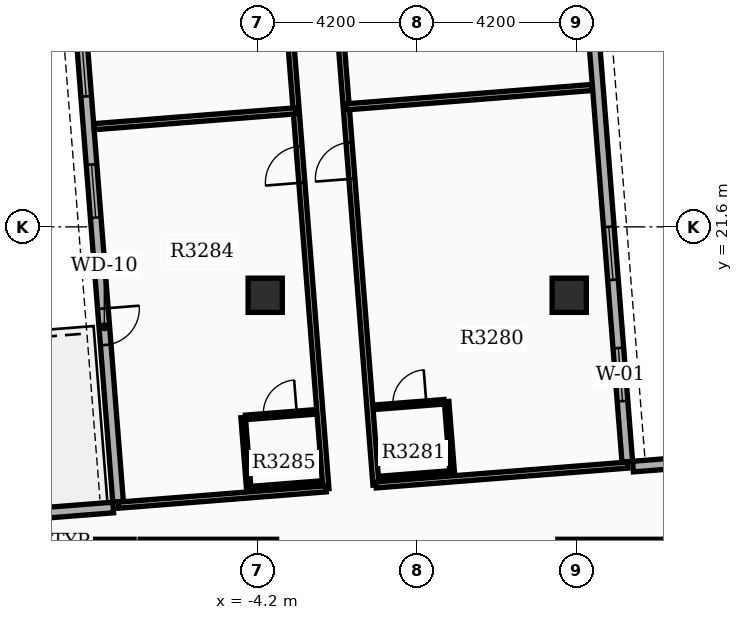
"""IFC4 building model, lengths in metres.
Left out: names, types, materials, properties, quantities, classifications, styles, units other than length and angle.
Written with IfcOpenShell. Run it as: python <this file> out.ifc"""

import sys

from ifc_helpers import new_model, si_unit, direction, frame, frame_2d, origin, origin_2d, place, context, subcontext, project, spatial, rectangle, extrude, element, fill, save


model = new_model("IFC4")
c1 = context("Model", 3, precision=1e-05, world=origin(), true_north=direction((0.0, 1.0)))
c2 = subcontext(c1, "Body", "Model", "MODEL_VIEW")
j1 = project(units=[si_unit("LENGTHUNIT", "METRE"), si_unit("PLANEANGLEUNIT", "RADIAN")], contexts=[c1])
p1 = place(None, origin())
s1 = spatial("IfcSite", under=j1, at=p1, CompositionType="ELEMENT")
p2 = place(p1, origin())
s2 = spatial("IfcBuilding", under=s1, at=p2, CompositionType="ELEMENT")
p3 = place(p2, frame((0.0, 0.0, 205.2)))
s3 = spatial("IfcBuildingStorey", under=s2, at=p3, CompositionType="ELEMENT", Elevation=205.2)
for number, where, z_axis, x_axis in (
    (1, (-4.0, 19.8, 0.0), (0.0, 0.0, 1.0), (1.0, 0.0, 0.0)),
    (2, (4.0, 19.8, 0.0), (0.0, 0.0, 1.0), (1.0, 0.0, 0.0)),
):
    element("IfcColumn", number, at=place(p3, frame(where, z_axis=z_axis, x_axis=x_axis)), inside=s3, PredefinedType="COLUMN", context=c2, shape_type="SweptSolid", body=[
        extrude(rectangle(XDim=0.9, YDim=0.9, at=origin_2d()), origin(), (0.0, 0.0, 1.0), 3.9),
    ])
p4 = place(p3, frame((5.527, 15.421, 0.0), z_axis=(0.0, 0.0, 1.0), x_axis=(-0.078452802979, 0.996917828963, 0.0)))
e3 = element("IfcWall", 3, at=p4, inside=s3, PredefinedType="STANDARD", context=c2, shape_type="SweptSolid", body=[
    extrude(rectangle(XDim=20.1, YDim=0.28, at=frame_2d((10.05, 0.0))), origin(), (0.0, 0.0, 1.0), 3.18),
])
p5 = place(p4, frame((1.6, 0.0, 0.8)))
e4 = element("IfcOpeningElement", 4, at=p5, cuts=e3, PredefinedType="OPENING", context=c2, shape_type="SweptSolid", body=[
    extrude(rectangle(XDim=1.4, YDim=1.6, at=frame_2d((0.7, 0.8))), frame((0.0, 0.15, 0.0), z_axis=(0.0, -1.0, 0.0), x_axis=(1.0, 0.0, 0.0)), (0.0, 0.0, 1.0), 0.3),
])
p6 = place(p4, frame((4.8, 0.0, 0.8)))
e5 = element("IfcOpeningElement", 5, at=p6, cuts=e3, PredefinedType="OPENING", context=c2, shape_type="SweptSolid", body=[
    extrude(rectangle(XDim=1.4, YDim=1.6, at=frame_2d((0.7, 0.8))), frame((0.0, 0.15, 0.0), z_axis=(0.0, -1.0, 0.0), x_axis=(1.0, 0.0, 0.0)), (0.0, 0.0, 1.0), 0.3),
])
p7 = place(p4, frame((12.75, 0.0, 0.8)))
e6 = element("IfcOpeningElement", 6, at=p7, cuts=e3, PredefinedType="OPENING", context=c2, shape_type="SweptSolid", body=[
    extrude(rectangle(XDim=1.4, YDim=1.6, at=frame_2d((0.7, 0.8))), frame((0.0, 0.15, 0.0), z_axis=(0.0, -1.0, 0.0), x_axis=(1.0, 0.0, 0.0)), (0.0, 0.0, 1.0), 0.3),
])
p8 = place(p4, frame((15.95, 0.0, 0.8)))
e7 = element("IfcOpeningElement", 7, at=p8, cuts=e3, PredefinedType="OPENING", context=c2, shape_type="SweptSolid", body=[
    extrude(rectangle(XDim=1.4, YDim=1.6, at=frame_2d((0.7, 0.8))), frame((0.0, 0.15, 0.0), z_axis=(0.0, -1.0, 0.0), x_axis=(1.0, 0.0, 0.0)), (0.0, 0.0, 1.0), 0.3),
])
p9 = place(p3, frame((-9.448, 34.405, 0.0), z_axis=(0.0, 0.0, 1.0), x_axis=(0.078452802979, -0.996917828963, 0.0)))
e8 = element("IfcWall", 8, at=p9, inside=s3, PredefinedType="STANDARD", context=c2, shape_type="SweptSolid", body=[
    extrude(rectangle(XDim=20.1, YDim=0.28, at=frame_2d((10.05, 0.0))), origin(), (0.0, 0.0, 1.0), 3.18),
])
p10 = place(p9, frame((1.6, 0.0, 0.8)))
e9 = element("IfcOpeningElement", 9, at=p10, cuts=e8, PredefinedType="OPENING", context=c2, shape_type="SweptSolid", body=[
    extrude(rectangle(XDim=1.4, YDim=1.6, at=frame_2d((0.7, 0.8))), frame((0.0, 0.15, 0.0), z_axis=(0.0, -1.0, 0.0), x_axis=(1.0, 0.0, 0.0)), (0.0, 0.0, 1.0), 0.3),
])
p11 = place(p9, frame((4.8, 0.0, 0.8)))
e10 = element("IfcOpeningElement", 10, at=p11, cuts=e8, PredefinedType="OPENING", context=c2, shape_type="SweptSolid", body=[
    extrude(rectangle(XDim=1.4, YDim=1.6, at=frame_2d((0.7, 0.8))), frame((0.0, 0.15, 0.0), z_axis=(0.0, -1.0, 0.0), x_axis=(1.0, 0.0, 0.0)), (0.0, 0.0, 1.0), 0.3),
])
p12 = place(p9, frame((8.0, 0.0, 0.8)))
e11 = element("IfcOpeningElement", 11, at=p12, cuts=e8, PredefinedType="OPENING", context=c2, shape_type="SweptSolid", body=[
    extrude(rectangle(XDim=1.4, YDim=1.6, at=frame_2d((0.7, 0.8))), frame((0.0, 0.15, 0.0), z_axis=(0.0, -1.0, 0.0), x_axis=(1.0, 0.0, 0.0)), (0.0, 0.0, 1.0), 0.3),
])
p13 = place(p9, frame((11.2, 0.0, 0.8)))
e12 = element("IfcOpeningElement", 12, at=p13, cuts=e8, PredefinedType="OPENING", context=c2, shape_type="SweptSolid", body=[
    extrude(rectangle(XDim=1.4, YDim=1.6, at=frame_2d((0.7, 0.8))), frame((0.0, 0.15, 0.0), z_axis=(0.0, -1.0, 0.0), x_axis=(1.0, 0.0, 0.0)), (0.0, 0.0, 1.0), 0.3),
])
p14 = place(p9, frame((15.0, 0.0, 0.0)))
e13 = element("IfcOpeningElement", 13, at=p14, cuts=e8, PredefinedType="OPENING", context=c2, shape_type="SweptSolid", body=[
    extrude(rectangle(XDim=0.96, YDim=2.1, at=frame_2d((0.48, 1.05))), frame((0.0, 0.15, 0.0), z_axis=(0.0, -1.0, 0.0), x_axis=(1.0, 0.0, 0.0)), (0.0, 0.0, 1.0), 0.3),
])
p15 = place(p3, frame((11.958, 15.787, 0.0), z_axis=(0.0, 0.0, 1.0), x_axis=(-0.996916125428, -0.078474447191, 0.0)))
e14 = element("IfcWall", 14, at=p15, inside=s3, PredefinedType="STANDARD", context=c2, shape_type="SweptSolid", body=[
    extrude(rectangle(XDim=6.3, YDim=0.28, at=frame_2d((3.15, 0.0))), origin(), (0.0, 0.0, 1.0), 3.18),
])
p16 = place(p3, frame((-14.281, 13.722, 0.0), z_axis=(0.0, 0.0, 1.0), x_axis=(0.99691915642, 0.078435932851, 0.0)))
e15 = element("IfcWall", 15, at=p16, inside=s3, PredefinedType="STANDARD", context=c2, shape_type="SweptSolid", body=[
    extrude(rectangle(XDim=6.3, YDim=0.28, at=frame_2d((3.15, 0.0))), origin(), (0.0, 0.0, 1.0), 3.18),
])
p17 = place(p3, frame((-11.0, 13.3, 0.0), z_axis=(0.0, 0.0, 1.0), x_axis=(1.0, 0.0, 0.0)))
e16 = element("IfcWall", 16, at=p17, inside=s3, PredefinedType="PARTITIONING", context=c2, shape_type="SweptSolid", body=[
    extrude(rectangle(XDim=3.55, YDim=0.16, at=frame_2d((1.775, 0.0))), origin(), (0.0, 0.0, 1.0), 3.17),
])
p18 = place(p3, frame((-7.29, 13.3, 0.0), z_axis=(0.0, 0.0, 1.0), x_axis=(1.0, 0.0, 0.0)))
e17 = element("IfcWall", 17, at=p18, inside=s3, PredefinedType="PARTITIONING", context=c2, shape_type="SweptSolid", body=[
    extrude(rectangle(XDim=3.59, YDim=0.16, at=frame_2d((1.795, 0.0))), origin(), (0.0, 0.0, 1.0), 3.17),
])
p19 = place(p3, frame((3.7, 13.3, 0.0), z_axis=(0.0, 0.0, 1.0), x_axis=(1.0, 0.0, 0.0)))
e18 = element("IfcWall", 18, at=p19, inside=s3, PredefinedType="PARTITIONING", context=c2, shape_type="SweptSolid", body=[
    extrude(rectangle(XDim=3.75, YDim=0.16, at=frame_2d((1.875, 0.0))), origin(), (0.0, 0.0, 1.0), 3.17),
])
p20 = place(p3, frame((-1.085, 14.811, 0.0), z_axis=(0.0, 0.0, 1.0), x_axis=(-0.0784484395, 0.996918172339, 0.0)))
e19 = element("IfcWall", 19, at=p20, inside=s3, PredefinedType="PARTITIONING", context=c2, shape_type="SweptSolid", body=[
    extrude(rectangle(XDim=20.182, YDim=0.16, at=frame_2d((10.091, 0.0))), origin(), (0.0, 0.0, 1.0), 3.17),
])
p21 = place(p20, frame((8.08, 0.0, 0.0)))
e20 = element("IfcOpeningElement", 20, at=p21, cuts=e19, PredefinedType="OPENING", context=c2, shape_type="SweptSolid", body=[
    extrude(rectangle(XDim=0.96, YDim=2.15, at=frame_2d((0.48, 1.075))), frame((0.0, 0.09, 0.0), z_axis=(0.0, -1.0, 0.0), x_axis=(1.0, 0.0, 0.0)), (0.0, 0.0, 1.0), 0.18),
])
p22 = place(p20, frame((16.247, 0.0, 0.0)))
e21 = element("IfcOpeningElement", 21, at=p22, cuts=e19, PredefinedType="OPENING", context=c2, shape_type="SweptSolid", body=[
    extrude(rectangle(XDim=0.96, YDim=2.15, at=frame_2d((0.48, 1.075))), frame((0.0, 0.09, 0.0), z_axis=(0.0, -1.0, 0.0), x_axis=(1.0, 0.0, 0.0)), (0.0, 0.0, 1.0), 0.18),
])
p23 = place(p3, frame((-1.085, 14.811, 0.0), z_axis=(0.0, 0.0, 1.0), x_axis=(0.996917098135, 0.078462089231, 0.0)))
e22 = element("IfcWall", 22, at=p23, inside=s3, PredefinedType="PARTITIONING", context=c2, shape_type="SweptSolid", body=[
    extrude(rectangle(XDim=6.64, YDim=0.16, at=frame_2d((3.32, 0.0))), origin(), (0.0, 0.0, 1.0), 3.17),
])
p24 = place(p3, frame((-1.868, 24.758, 0.0), z_axis=(0.0, 0.0, 1.0), x_axis=(0.996918226549, 0.078447750597, 0.0)))
e23 = element("IfcWall", 23, at=p24, inside=s3, PredefinedType="PARTITIONING", context=c2, shape_type="SweptSolid", body=[
    extrude(rectangle(XDim=6.492, YDim=0.16, at=frame_2d((3.246, 0.0))), origin(), (0.0, 0.0, 1.0), 3.17),
])
p25 = place(p3, frame((-1.106, 16.855, 0.0), z_axis=(0.0, 0.0, 1.0), x_axis=(0.996916400774, 0.0784709492, 0.0)))
e24 = element("IfcWall", 24, at=p25, inside=s3, PredefinedType="PARTITIONING", context=c2, shape_type="SweptSolid", body=[
    extrude(rectangle(XDim=1.82, YDim=0.12, at=frame_2d((0.91, 0.0))), origin(), (0.0, 0.0, 1.0), 3.17),
])
p26 = place(p25, frame((0.47, 0.0, 0.0)))
e25 = element("IfcOpeningElement", 25, at=p26, cuts=e24, PredefinedType="OPENING", context=c2, shape_type="SweptSolid", body=[
    extrude(rectangle(XDim=0.88, YDim=2.1, at=frame_2d((0.44, 1.05))), frame((0.0, 0.07, 0.0), z_axis=(0.0, -1.0, 0.0), x_axis=(1.0, 0.0, 0.0)), (0.0, 0.0, 1.0), 0.14),
])
p27 = place(p3, frame((-0.958, 14.981, 0.0), z_axis=(0.0, 0.0, 1.0), x_axis=(0.996915574626, 0.078481444107, 0.0)))
e26 = element("IfcWall", 26, at=p27, inside=s3, PredefinedType="PARTITIONING", context=c2, shape_type="SweptSolid", body=[
    extrude(rectangle(XDim=1.82, YDim=0.12, at=frame_2d((0.91, 0.0))), origin(), (0.0, 0.0, 1.0), 3.17),
])
p28 = place(p3, frame((0.921, 15.129, 0.0), z_axis=(0.0, 0.0, 1.0), x_axis=(-0.078563244057, 0.996909131608, 0.0)))
e27 = element("IfcWall", 27, at=p28, inside=s3, PredefinedType="PARTITIONING", context=c2, shape_type="SweptSolid", body=[
    extrude(rectangle(XDim=1.88, YDim=0.12, at=frame_2d((0.94, 0.0))), origin(), (0.0, 0.0, 1.0), 3.17),
])
p29 = place(p3, frame((-2.401, 14.707, 0.0), z_axis=(0.0, 0.0, 1.0), x_axis=(-0.078460461943, 0.996917226209, 0.0)))
e28 = element("IfcWall", 28, at=p29, inside=s3, PredefinedType="PARTITIONING", context=c2, shape_type="SweptSolid", body=[
    extrude(rectangle(XDim=20.182, YDim=0.16, at=frame_2d((10.091, 0.0))), origin(), (0.0, 0.0, 1.0), 3.17),
])
p30 = place(p29, frame((8.08, 0.0, 0.0)))
e29 = element("IfcOpeningElement", 29, at=p30, cuts=e28, PredefinedType="OPENING", context=c2, shape_type="SweptSolid", body=[
    extrude(rectangle(XDim=0.96, YDim=2.15, at=frame_2d((0.48, 1.075))), frame((0.0, 0.09, 0.0), z_axis=(0.0, -1.0, 0.0), x_axis=(1.0, 0.0, 0.0)), (0.0, 0.0, 1.0), 0.18),
])
p31 = place(p29, frame((16.247, 0.0, 0.0)))
e30 = element("IfcOpeningElement", 30, at=p31, cuts=e28, PredefinedType="OPENING", context=c2, shape_type="SweptSolid", body=[
    extrude(rectangle(XDim=0.96, YDim=2.15, at=frame_2d((0.48, 1.075))), frame((0.0, 0.09, 0.0), z_axis=(0.0, -1.0, 0.0), x_axis=(1.0, 0.0, 0.0)), (0.0, 0.0, 1.0), 0.18),
])
p32 = place(p3, frame((-2.401, 14.707, 0.0), z_axis=(0.0, 0.0, 1.0), x_axis=(-0.996921193864, -0.078410032676, 0.0)))
e31 = element("IfcWall", 31, at=p32, inside=s3, PredefinedType="PARTITIONING", context=c2, shape_type="SweptSolid", body=[
    extrude(rectangle(XDim=5.48, YDim=0.16, at=frame_2d((2.74, 0.0))), origin(), (0.0, 0.0, 1.0), 3.17),
])
p33 = place(p3, frame((-3.184, 24.654, 0.0), z_axis=(0.0, 0.0, 1.0), x_axis=(-0.996915801681, -0.078478559871, 0.0)))
e32 = element("IfcWall", 32, at=p33, inside=s3, PredefinedType="PARTITIONING", context=c2, shape_type="SweptSolid", body=[
    extrude(rectangle(XDim=5.332, YDim=0.16, at=frame_2d((2.666, 0.0))), origin(), (0.0, 0.0, 1.0), 3.17),
])
p34 = place(p3, frame((-4.515, 16.587, 0.0), z_axis=(0.0, 0.0, 1.0), x_axis=(0.996916400774, 0.0784709492, 0.0)))
e33 = element("IfcWall", 33, at=p34, inside=s3, PredefinedType="PARTITIONING", context=c2, shape_type="SweptSolid", body=[
    extrude(rectangle(XDim=1.82, YDim=0.12, at=frame_2d((0.91, 0.0))), origin(), (0.0, 0.0, 1.0), 3.17),
])
p35 = place(p34, frame((0.47, 0.0, 0.0)))
e34 = element("IfcOpeningElement", 34, at=p35, cuts=e33, PredefinedType="OPENING", context=c2, shape_type="SweptSolid", body=[
    extrude(rectangle(XDim=0.88, YDim=2.1, at=frame_2d((0.44, 1.05))), frame((0.0, 0.07, 0.0), z_axis=(0.0, -1.0, 0.0), x_axis=(1.0, 0.0, 0.0)), (0.0, 0.0, 1.0), 0.14),
])
p36 = place(p3, frame((-4.368, 14.713, 0.0), z_axis=(0.0, 0.0, 1.0), x_axis=(0.996916400774, 0.0784709492, 0.0)))
e35 = element("IfcWall", 35, at=p36, inside=s3, PredefinedType="PARTITIONING", context=c2, shape_type="SweptSolid", body=[
    extrude(rectangle(XDim=1.82, YDim=0.12, at=frame_2d((0.91, 0.0))), origin(), (0.0, 0.0, 1.0), 3.17),
])
p37 = place(p3, frame((-4.433, 14.708, 0.0), z_axis=(0.0, 0.0, 1.0), x_axis=(-0.07843418698, 0.996919293781, 0.0)))
e36 = element("IfcWall", 36, at=p37, inside=s3, PredefinedType="PARTITIONING", context=c2, shape_type="SweptSolid", body=[
    extrude(rectangle(XDim=1.88, YDim=0.12, at=frame_2d((0.94, 0.0))), origin(), (0.0, 0.0, 1.0), 3.17),
])
p38 = place(p5, origin())
e37 = element("IfcWindow", 37, at=p38, inside=s3, PartitioningType="SINGLE_PANEL", PredefinedType="WINDOW", context=c2, shape_type="SweptSolid", body=[
    extrude(rectangle(XDim=1.4, YDim=1.6, at=frame_2d((0.7, 0.8))), frame((0.0, 0.03, 0.0), z_axis=(0.0, -1.0, 0.0), x_axis=(1.0, 0.0, 0.0)), (0.0, 0.0, 1.0), 0.06),
])
fill(e4, e37)
p39 = place(p6, origin())
e38 = element("IfcWindow", 38, at=p39, inside=s3, PartitioningType="SINGLE_PANEL", PredefinedType="WINDOW", context=c2, shape_type="SweptSolid", body=[
    extrude(rectangle(XDim=1.4, YDim=1.6, at=frame_2d((0.7, 0.8))), frame((0.0, 0.03, 0.0), z_axis=(0.0, -1.0, 0.0), x_axis=(1.0, 0.0, 0.0)), (0.0, 0.0, 1.0), 0.06),
])
fill(e5, e38)
p40 = place(p12, origin())
e39 = element("IfcWindow", 39, at=p40, inside=s3, PartitioningType="SINGLE_PANEL", PredefinedType="WINDOW", context=c2, shape_type="SweptSolid", body=[
    extrude(rectangle(XDim=1.4, YDim=1.6, at=frame_2d((0.7, 0.8))), frame((0.0, 0.03, 0.0), z_axis=(0.0, -1.0, 0.0), x_axis=(1.0, 0.0, 0.0)), (0.0, 0.0, 1.0), 0.06),
])
fill(e11, e39)
p41 = place(p13, origin())
e40 = element("IfcWindow", 40, at=p41, inside=s3, PartitioningType="SINGLE_PANEL", PredefinedType="WINDOW", context=c2, shape_type="SweptSolid", body=[
    extrude(rectangle(XDim=1.4, YDim=1.6, at=frame_2d((0.7, 0.8))), frame((0.0, 0.03, 0.0), z_axis=(0.0, -1.0, 0.0), x_axis=(1.0, 0.0, 0.0)), (0.0, 0.0, 1.0), 0.06),
])
fill(e12, e40)
p42 = place(p14, origin())
e41 = element("IfcDoor", 41, at=p42, inside=s3, OperationType="SINGLE_SWING_LEFT", PredefinedType="DOOR", context=c2, shape_type="SweptSolid", body=[
    extrude(rectangle(XDim=0.96, YDim=2.1, at=frame_2d((0.48, 1.05))), frame((0.0, 0.025, 0.0), z_axis=(0.0, -1.0, 0.0), x_axis=(1.0, 0.0, 0.0)), (0.0, 0.0, 1.0), 0.05),
])
fill(e13, e41)
p43 = place(p21, origin())
e42 = element("IfcDoor", 42, at=p43, inside=s3, OperationType="SINGLE_SWING_LEFT", PredefinedType="DOOR", context=c2, shape_type="SweptSolid", body=[
    extrude(rectangle(XDim=0.96, YDim=2.15, at=frame_2d((0.48, 1.075))), frame((0.0, 0.025, 0.0), z_axis=(0.0, -1.0, 0.0), x_axis=(1.0, 0.0, 0.0)), (0.0, 0.0, 1.0), 0.05),
])
fill(e20, e42)
p44 = place(p26, origin())
e43 = element("IfcDoor", 43, at=p44, inside=s3, OperationType="SINGLE_SWING_RIGHT", PredefinedType="DOOR", context=c2, shape_type="SweptSolid", body=[
    extrude(rectangle(XDim=0.88, YDim=2.1, at=frame_2d((0.44, 1.05))), frame((0.0, 0.025, 0.0), z_axis=(0.0, -1.0, 0.0), x_axis=(1.0, 0.0, 0.0)), (0.0, 0.0, 1.0), 0.05),
])
fill(e25, e43)
p45 = place(p30, origin())
e44 = element("IfcDoor", 44, at=p45, inside=s3, OperationType="SINGLE_SWING_LEFT", PredefinedType="DOOR", context=c2, shape_type="SweptSolid", body=[
    extrude(rectangle(XDim=0.96, YDim=2.15, at=frame_2d((0.48, 1.075))), frame((0.0, 0.025, 0.0), z_axis=(0.0, -1.0, 0.0), x_axis=(1.0, 0.0, 0.0)), (0.0, 0.0, 1.0), 0.05),
])
fill(e29, e44)
p46 = place(p35, origin())
e45 = element("IfcDoor", 45, at=p46, inside=s3, OperationType="SINGLE_SWING_RIGHT", PredefinedType="DOOR", context=c2, shape_type="SweptSolid", body=[
    extrude(rectangle(XDim=0.88, YDim=2.1, at=frame_2d((0.44, 1.05))), frame((0.0, 0.025, 0.0), z_axis=(0.0, -1.0, 0.0), x_axis=(1.0, 0.0, 0.0)), (0.0, 0.0, 1.0), 0.05),
])
fill(e34, e45)
save(model, sys.argv[1])
